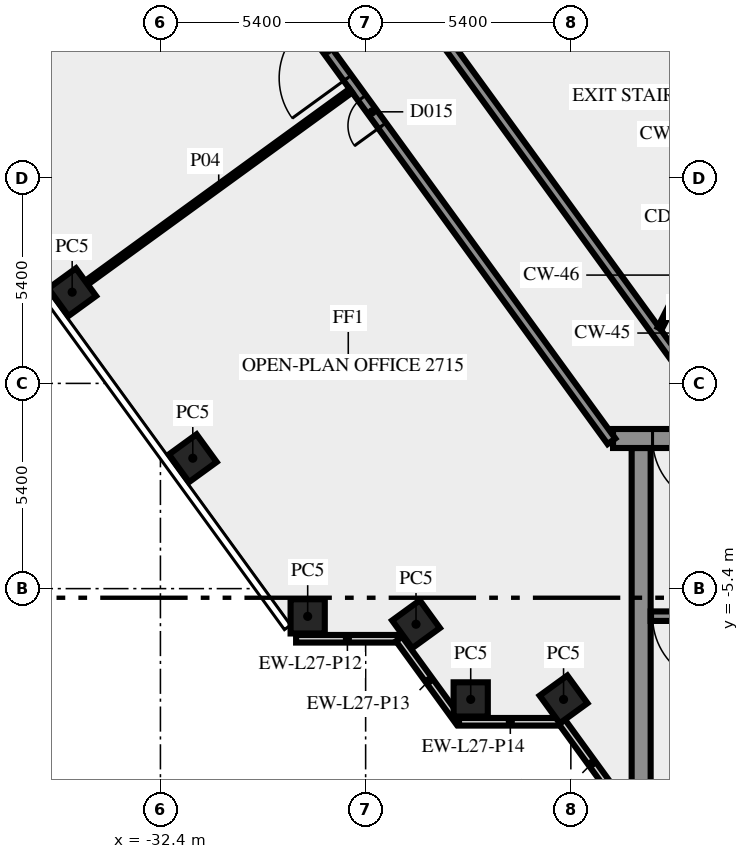
"""IFC4 building model, lengths in metres.
Left out: names, types, materials, properties, quantities, classifications, styles, units other than length and angle.
Written with IfcOpenShell. Run it as: python <this file> out.ifc"""

import sys

from ifc_helpers import new_model, si_unit, direction, frame, frame_2d, origin, origin_2d, place, context, subcontext, project, spatial, rectangle, extrude, element, fill, save


model = new_model("IFC4")
c1 = context("Model", 3, precision=1e-05, world=origin(), true_north=direction((0.0, 1.0)))
c2 = subcontext(c1, "Body", "Model", "MODEL_VIEW")
j1 = project(units=[si_unit("LENGTHUNIT", "METRE"), si_unit("PLANEANGLEUNIT", "RADIAN")], contexts=[c1])
p1 = place(None, origin())
s1 = spatial("IfcSite", under=j1, at=p1, CompositionType="ELEMENT")
p2 = place(p1, origin())
s2 = spatial("IfcBuilding", under=s1, at=p2, CompositionType="ELEMENT")
p3 = place(p2, frame((0.0, 0.0, 117.0)))
s3 = spatial("IfcBuildingStorey", under=s2, at=p3, CompositionType="ELEMENT", Elevation=117.0)
for number, where, z_axis, x_axis in (
    (1, (-34.722, 2.4, 0.0), (0.0, 0.0, 1.0), (0.588, -0.809, 0.0)),
    (2, (-31.548, -1.969, 0.0), (0.0, 0.0, 1.0), (0.588, -0.809, 0.0)),
    (3, (-28.525, -6.13, 0.0), (0.0, 0.0, 1.0), (1.0, 0.0, 0.0)),
    (4, (-25.674, -6.337, 0.0), (0.0, 0.0, 1.0), (0.588, -0.809, 0.0)),
    (5, (-24.235, -8.315, 0.0), (0.0, 0.0, 1.0), (1.0, 0.0, 0.0)),
    (6, (-21.792, -8.315, 0.0), (0.0, 0.0, 1.0), (0.588, -0.809, 0.0)),
):
    element("IfcColumn", number, at=place(p3, frame(where, z_axis=z_axis, x_axis=x_axis)), inside=s3, PredefinedType="COLUMN", context=c2, shape_type="SweptSolid", body=[
        extrude(rectangle(XDim=0.9, YDim=0.9, at=origin_2d()), origin(), (0.0, 0.0, 1.0), 3.65),
    ])
p4 = place(p3, frame((-28.83, -6.719, 0.0), z_axis=(0.0, 0.0, 1.0), x_axis=(1.0, 0.0, 0.0)))
e7 = element("IfcWall", 7, at=p4, inside=s3, PredefinedType="SOLIDWALL", context=c2, shape_type="SweptSolid", body=[
    extrude(rectangle(XDim=2.7, YDim=0.2, at=frame_2d((1.35, 0.0))), origin(), (0.0, 0.0, 1.0), 3.65),
])
p5 = place(p3, frame((-26.12, -6.724, 0.0), z_axis=(0.0, 0.0, 1.0), x_axis=(0.587720002413, -0.809064397168, 0.0)))
e8 = element("IfcWall", 8, at=p5, inside=s3, PredefinedType="SOLIDWALL", context=c2, shape_type="SweptSolid", body=[
    extrude(rectangle(XDim=2.7, YDim=0.2, at=frame_2d((1.35, 0.0))), origin(), (0.0, 0.0, 1.0), 3.65),
])
p6 = place(p3, frame((-24.543, -8.904, 0.0), z_axis=(0.0, 0.0, 1.0), x_axis=(1.0, 0.0, 0.0)))
e9 = element("IfcWall", 9, at=p6, inside=s3, PredefinedType="SOLIDWALL", context=c2, shape_type="SweptSolid", body=[
    extrude(rectangle(XDim=2.7, YDim=0.2, at=frame_2d((1.35, 0.0))), origin(), (0.0, 0.0, 1.0), 3.65),
])
p7 = place(p3, frame((-21.833, -8.909, 0.0), z_axis=(0.0, 0.0, 1.0), x_axis=(0.587766567315, -0.809030569476, 0.0)))
e10 = element("IfcWall", 10, at=p7, inside=s3, PredefinedType="SOLIDWALL", context=c2, shape_type="SweptSolid", body=[
    extrude(rectangle(XDim=2.688, YDim=0.2, at=frame_2d((1.344, 0.0))), origin(), (0.0, 0.0, 1.0), 3.65),
])
p8 = place(p3, frame((-19.75, -10.5, 0.0), z_axis=(0.0, 0.0, 1.0), x_axis=(0.0, 1.0, 0.0)))
e11 = element("IfcWall", 11, at=p8, inside=s3, PredefinedType="SHEAR", context=c2, shape_type="SweptSolid", body=[
    extrude(rectangle(XDim=8.8, YDim=0.5, at=frame_2d((4.4, 0.0))), origin(), (0.0, 0.0, 1.0), 3.65),
])
p9 = place(p3, frame((-11.45, -6.125, 0.0), z_axis=(0.0, 0.0, 1.0), x_axis=(-1.0, 0.0, 0.0)))
e12 = element("IfcWall", 12, at=p9, inside=s3, PredefinedType="SHEAR", context=c2, shape_type="SweptSolid", body=[
    extrude(rectangle(XDim=8.05, YDim=0.25, at=frame_2d((4.025, 0.0))), origin(), (0.0, 0.0, 1.0), 3.65),
])
p10 = place(p9, frame((6.2, 0.0, 0.0)))
e13 = element("IfcOpeningElement", 13, at=p10, cuts=e12, PredefinedType="OPENING", context=c2, shape_type="SweptSolid", body=[
    extrude(rectangle(XDim=1.8, YDim=2.1, at=frame_2d((0.9, 1.05))), frame((0.0, 0.135, 0.0), z_axis=(0.0, -1.0, 0.0), x_axis=(1.0, 0.0, 0.0)), (0.0, 0.0, 1.0), 0.27),
])
p11 = place(p3, frame((20.49, -1.45, 0.0), z_axis=(0.0, 0.0, 1.0), x_axis=(-1.0, 0.0, 0.0)))
e14 = element("IfcWall", 14, at=p11, inside=s3, PredefinedType="SHEAR", context=c2, shape_type="SweptSolid", body=[
    extrude(rectangle(XDim=40.98, YDim=0.5, at=frame_2d((20.49, 0.0))), origin(), (0.0, 0.0, 1.0), 3.65),
])
p12 = place(p11, frame((38.14, 0.0, 0.0)))
e15 = element("IfcOpeningElement", 15, at=p12, cuts=e14, PredefinedType="OPENING", context=c2, shape_type="SweptSolid", body=[
    extrude(rectangle(XDim=1.8, YDim=2.1, at=frame_2d((0.9, 1.05))), frame((0.0, 0.26, 0.0), z_axis=(0.0, -1.0, 0.0), x_axis=(1.0, 0.0, 0.0)), (0.0, 0.0, 1.0), 0.52),
])
p13 = place(p11, frame((36.728, 0.0, 0.0)))
e16 = element("IfcOpeningElement", 16, at=p13, cuts=e14, PredefinedType="OPENING", context=c2, shape_type="SweptSolid", body=[
    extrude(rectangle(XDim=0.8, YDim=2.1, at=frame_2d((0.4, 1.05))), frame((0.0, 0.26, 0.0), z_axis=(0.0, -1.0, 0.0), x_axis=(1.0, 0.0, 0.0)), (0.0, 0.0, 1.0), 0.52),
])
p14 = place(p11, frame((35.153, 0.0, 0.0)))
e17 = element("IfcOpeningElement", 17, at=p14, cuts=e14, PredefinedType="OPENING", context=c2, shape_type="SweptSolid", body=[
    extrude(rectangle(XDim=0.8, YDim=2.1, at=frame_2d((0.4, 1.05))), frame((0.0, 0.26, 0.0), z_axis=(0.0, -1.0, 0.0), x_axis=(1.0, 0.0, 0.0)), (0.0, 0.0, 1.0), 0.52),
])
p15 = place(p11, frame((32.94, 0.0, 0.0)))
e18 = element("IfcOpeningElement", 18, at=p15, cuts=e14, PredefinedType="OPENING", context=c2, shape_type="SweptSolid", body=[
    extrude(rectangle(XDim=0.9, YDim=2.1, at=frame_2d((0.45, 1.05))), frame((0.0, 0.26, 0.0), z_axis=(0.0, -1.0, 0.0), x_axis=(1.0, 0.0, 0.0)), (0.0, 0.0, 1.0), 0.52),
])
p16 = place(p11, frame((21.765, 0.0, 0.0)))
e19 = element("IfcOpeningElement", 19, at=p16, cuts=e14, PredefinedType="OPENING", context=c2, shape_type="SweptSolid", body=[
    extrude(rectangle(XDim=2.0, YDim=2.1, at=frame_2d((1.0, 1.05))), frame((0.0, 0.26, 0.0), z_axis=(0.0, -1.0, 0.0), x_axis=(1.0, 0.0, 0.0)), (0.0, 0.0, 1.0), 0.52),
])
p17 = place(p11, frame((7.14, 0.0, 0.0)))
e20 = element("IfcOpeningElement", 20, at=p17, cuts=e14, PredefinedType="OPENING", context=c2, shape_type="SweptSolid", body=[
    extrude(rectangle(XDim=0.9, YDim=2.1, at=frame_2d((0.45, 1.05))), frame((0.0, 0.26, 0.0), z_axis=(0.0, -1.0, 0.0), x_axis=(1.0, 0.0, 0.0)), (0.0, 0.0, 1.0), 0.52),
])
p18 = place(p11, frame((4.19, 0.0, 0.0)))
e21 = element("IfcOpeningElement", 21, at=p18, cuts=e14, PredefinedType="OPENING", context=c2, shape_type="SweptSolid", body=[
    extrude(rectangle(XDim=0.9, YDim=2.1, at=frame_2d((0.45, 1.05))), frame((0.0, 0.26, 0.0), z_axis=(0.0, -1.0, 0.0), x_axis=(1.0, 0.0, 0.0)), (0.0, 0.0, 1.0), 0.52),
])
p19 = place(p11, frame((1.04, 0.0, 0.0)))
e22 = element("IfcOpeningElement", 22, at=p19, cuts=e14, PredefinedType="OPENING", context=c2, shape_type="SweptSolid", body=[
    extrude(rectangle(XDim=1.8, YDim=2.1, at=frame_2d((0.9, 1.05))), frame((0.0, 0.26, 0.0), z_axis=(0.0, -1.0, 0.0), x_axis=(1.0, 0.0, 0.0)), (0.0, 0.0, 1.0), 0.52),
])
p20 = place(p3, frame((-20.531, -1.523, 0.0), z_axis=(0.0, 0.0, 1.0), x_axis=(-0.587784522481, 0.809017524614, 0.0)))
e23 = element("IfcWall", 23, at=p20, inside=s3, PredefinedType="SOLIDWALL", context=c2, shape_type="SweptSolid", body=[
    extrude(rectangle(XDim=49.912, YDim=0.25, at=frame_2d((24.956, 0.0))), origin(), (0.0, 0.0, 1.0), 3.65),
])
p21 = place(p20, frame((10.266, 0.0, 0.0)))
e24 = element("IfcOpeningElement", 24, at=p21, cuts=e23, PredefinedType="OPENING", context=c2, shape_type="SweptSolid", body=[
    extrude(rectangle(XDim=0.9, YDim=2.1, at=frame_2d((0.45, 1.05))), frame((0.0, 0.135, 0.0), z_axis=(0.0, -1.0, 0.0), x_axis=(1.0, 0.0, 0.0)), (0.0, 0.0, 1.0), 0.27),
])
p22 = place(p20, frame((32.366, 0.0, 0.0)))
e25 = element("IfcOpeningElement", 25, at=p22, cuts=e23, PredefinedType="OPENING", context=c2, shape_type="SweptSolid", body=[
    extrude(rectangle(XDim=1.8, YDim=2.1, at=frame_2d((0.9, 1.05))), frame((0.0, 0.135, 0.0), z_axis=(0.0, -1.0, 0.0), x_axis=(1.0, 0.0, 0.0)), (0.0, 0.0, 1.0), 0.27),
])
p23 = place(p20, frame((11.815, 0.0, 0.0)))
e26 = element("IfcOpeningElement", 26, at=p23, cuts=e23, PredefinedType="OPENING", context=c2, shape_type="SweptSolid", body=[
    extrude(rectangle(XDim=1.8, YDim=2.1, at=frame_2d((0.9, 1.05))), frame((0.0, 0.135, 0.0), z_axis=(0.0, -1.0, 0.0), x_axis=(1.0, 0.0, 0.0)), (0.0, 0.0, 1.0), 0.27),
])
p24 = place(p20, frame((48.57, 0.0, 0.0)))
e27 = element("IfcOpeningElement", 27, at=p24, cuts=e23, PredefinedType="OPENING", context=c2, shape_type="SweptSolid", body=[
    extrude(rectangle(XDim=0.9, YDim=2.1, at=frame_2d((0.45, 1.05))), frame((0.0, 0.135, 0.0), z_axis=(0.0, -1.0, 0.0), x_axis=(1.0, 0.0, 0.0)), (0.0, 0.0, 1.0), 0.27),
])
p25 = place(p20, frame((35.915, 0.0, 0.0)))
e28 = element("IfcOpeningElement", 28, at=p25, cuts=e23, PredefinedType="OPENING", context=c2, shape_type="SweptSolid", body=[
    extrude(rectangle(XDim=0.9, YDim=2.1, at=frame_2d((0.45, 1.05))), frame((0.0, 0.135, 0.0), z_axis=(0.0, -1.0, 0.0), x_axis=(1.0, 0.0, 0.0)), (0.0, 0.0, 1.0), 0.27),
])
p26 = place(p3, frame((-37.232, 25.972, 0.0), z_axis=(0.0, 0.0, 1.0), x_axis=(0.587786323093, -0.809016216391, 0.0)))
e29 = element("IfcWall", 29, at=p26, inside=s3, PredefinedType="SOLIDWALL", context=c2, shape_type="SweptSolid", body=[
    extrude(rectangle(XDim=33.493, YDim=0.25, at=frame_2d((16.747, 0.0))), origin(), (0.0, 0.0, 1.0), 3.65),
])
p27 = place(p26, frame((5.385, 0.0, 0.0)))
e30 = element("IfcOpeningElement", 30, at=p27, cuts=e29, PredefinedType="OPENING", context=c2, shape_type="SweptSolid", body=[
    extrude(rectangle(XDim=0.9, YDim=2.1, at=frame_2d((0.45, 1.05))), frame((0.0, 0.135, 0.0), z_axis=(0.0, -1.0, 0.0), x_axis=(1.0, 0.0, 0.0)), (0.0, 0.0, 1.0), 0.27),
])
p28 = place(p26, frame((6.985, 0.0, 0.0)))
e31 = element("IfcOpeningElement", 31, at=p28, cuts=e29, PredefinedType="OPENING", context=c2, shape_type="SweptSolid", body=[
    extrude(rectangle(XDim=0.9, YDim=2.1, at=frame_2d((0.45, 1.05))), frame((0.0, 0.135, 0.0), z_axis=(0.0, -1.0, 0.0), x_axis=(1.0, 0.0, 0.0)), (0.0, 0.0, 1.0), 0.27),
])
p29 = place(p3, frame((-27.389, 7.703, 0.0), z_axis=(0.0, 0.0, 1.0), x_axis=(-0.809052894195, -0.587735837256, 0.0)))
e32 = element("IfcWall", 32, at=p29, inside=s3, PredefinedType="PARTITIONING", context=c2, shape_type="SweptSolid", body=[
    extrude(rectangle(XDim=8.594, YDim=0.12, at=frame_2d((4.297, 0.0))), origin(), (0.0, 0.0, 1.0), 3.65),
])
p30 = place(p3, frame((-19.261, 1.45, 0.0), z_axis=(0.0, 0.0, 1.0), x_axis=(0.453950796792, 0.891026752736, 0.0)))
e33 = element("IfcWall", 33, at=p30, inside=s3, PredefinedType="PARTITIONING", context=c2, shape_type="SweptSolid", body=[
    extrude(rectangle(XDim=2.778, YDim=0.12, at=frame_2d((1.389, 0.0))), origin(), (0.0, 0.0, 1.0), 3.65),
])
p31 = place(p10, origin())
e34 = element("IfcDoor", 34, at=p31, inside=s3, OperationType="DOUBLE_DOOR_SINGLE_SWING", PredefinedType="DOOR", context=c2, shape_type="SweptSolid", body=[
    extrude(rectangle(XDim=1.8, YDim=2.1, at=frame_2d((0.9, 1.05))), frame((0.0, 0.025, 0.0), z_axis=(0.0, -1.0, 0.0), x_axis=(1.0, 0.0, 0.0)), (0.0, 0.0, 1.0), 0.05),
])
fill(e13, e34)
p32 = place(p12, origin())
e35 = element("IfcDoor", 35, at=p32, inside=s3, OperationType="DOUBLE_DOOR_SINGLE_SWING", PredefinedType="DOOR", context=c2, shape_type="SweptSolid", body=[
    extrude(rectangle(XDim=1.8, YDim=2.1, at=frame_2d((0.9, 1.05))), frame((0.0, 0.025, 0.0), z_axis=(0.0, -1.0, 0.0), x_axis=(1.0, 0.0, 0.0)), (0.0, 0.0, 1.0), 0.05),
])
fill(e15, e35)
p33 = place(p21, origin())
e36 = element("IfcDoor", 36, at=p33, inside=s3, OperationType="SINGLE_SWING_RIGHT", PredefinedType="DOOR", context=c2, shape_type="SweptSolid", body=[
    extrude(rectangle(XDim=0.9, YDim=2.1, at=frame_2d((0.45, 1.05))), frame((0.0, 0.025, 0.0), z_axis=(0.0, -1.0, 0.0), x_axis=(1.0, 0.0, 0.0)), (0.0, 0.0, 1.0), 0.05),
])
fill(e24, e36)
p34 = place(p23, origin())
e37 = element("IfcDoor", 37, at=p34, inside=s3, OperationType="DOUBLE_DOOR_SINGLE_SWING", PredefinedType="DOOR", context=c2, shape_type="SweptSolid", body=[
    extrude(rectangle(XDim=1.8, YDim=2.1, at=frame_2d((0.9, 1.05))), frame((0.0, 0.025, 0.0), z_axis=(0.0, -1.0, 0.0), x_axis=(1.0, 0.0, 0.0)), (0.0, 0.0, 1.0), 0.05),
])
fill(e26, e37)
save(model, sys.argv[1])
